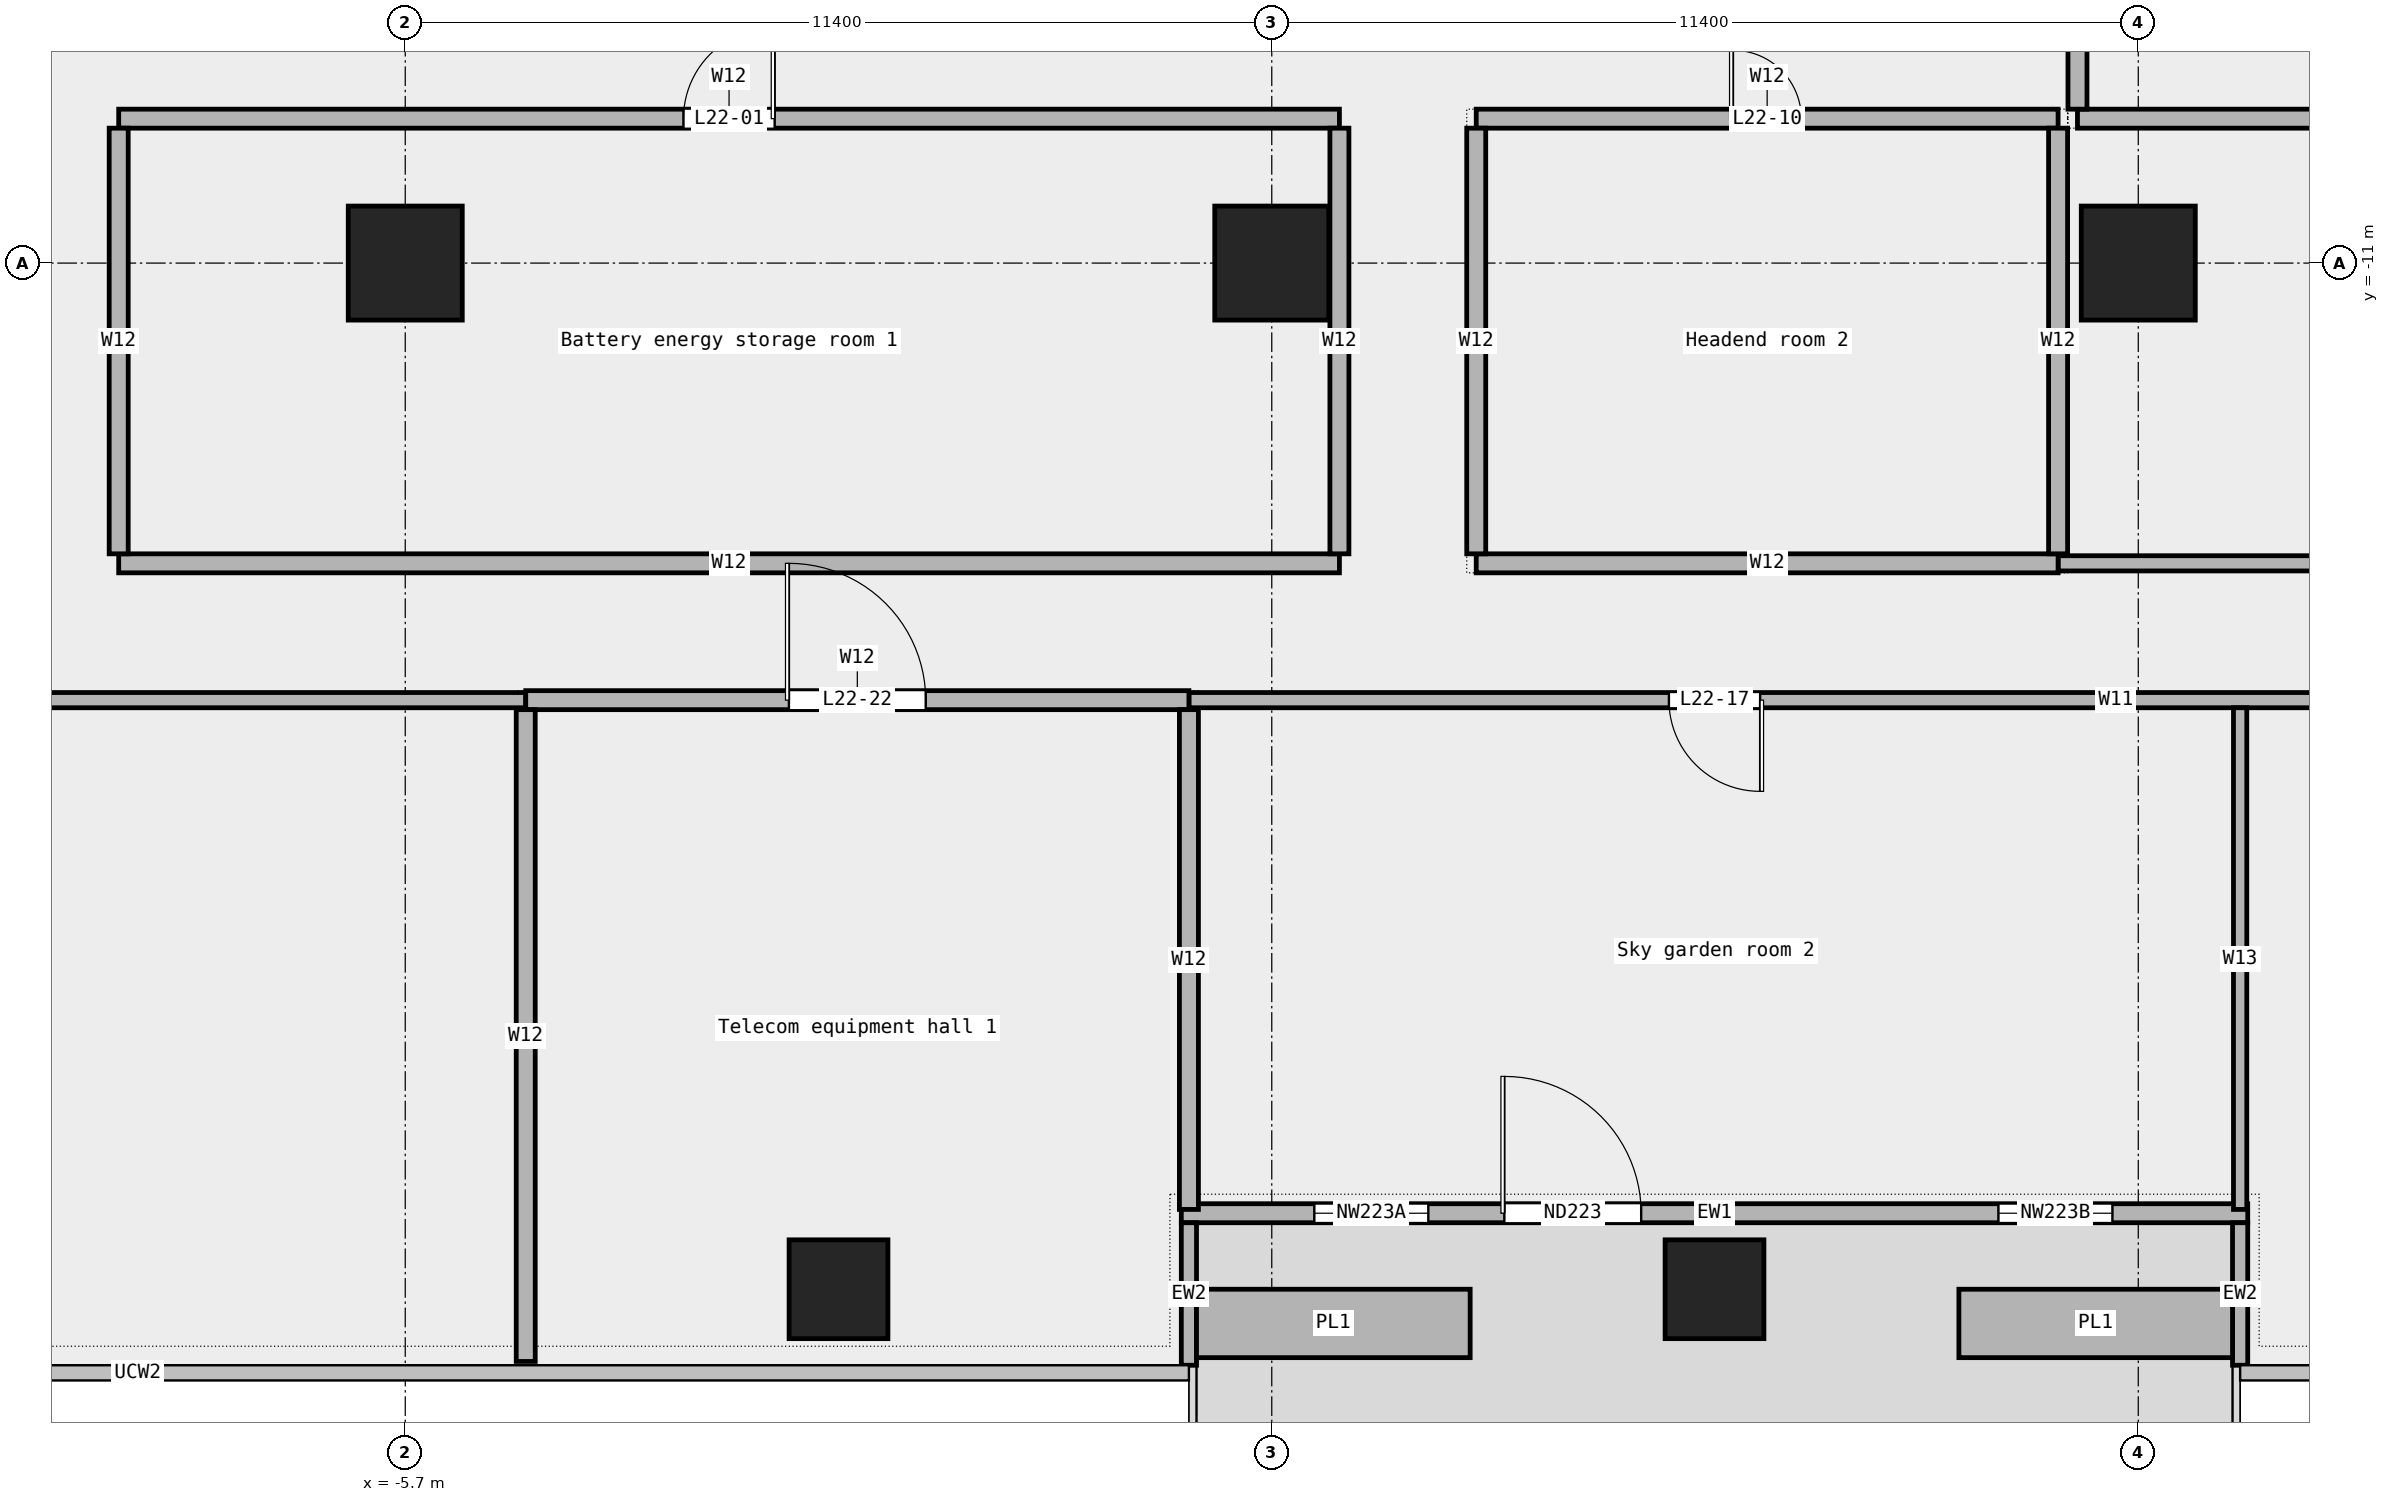
"""IFC4 building model, lengths in metres.
Left out: names, types, materials, properties, quantities, classifications, styles, units other than length and angle.
Written with IfcOpenShell. Run it as: python <this file> out.ifc"""

import sys

from ifc_helpers import new_model, si_unit, direction, frame, frame_2d, origin, origin_2d, place, context, subcontext, project, spatial, rectangle, extrude, element, fill, save


model = new_model("IFC4")
c1 = context("Model", 3, precision=1e-05, world=origin(), true_north=direction((0.0, 1.0)))
c2 = subcontext(c1, "Body", "Model", "MODEL_VIEW")
j1 = project(units=[si_unit("LENGTHUNIT", "METRE"), si_unit("PLANEANGLEUNIT", "RADIAN")], contexts=[c1])
p1 = place(None, origin())
s1 = spatial("IfcSite", under=j1, at=p1, CompositionType="ELEMENT")
p2 = place(p1, origin())
s2 = spatial("IfcBuilding", under=s1, at=p2, CompositionType="ELEMENT")
p3 = place(p2, frame((0.0, 0.0, 112.6)))
s3 = spatial("IfcBuildingStorey", under=s2, at=p3, CompositionType="ELEMENT", Elevation=112.6)
for number, where, z_axis, x_axis in (
    (1, (0.0, -24.5, 0.0), (0.0, 0.0, 1.0), (1.0, 0.0, 0.0)),
    (2, (11.525, -24.5, 0.0), (0.0, 0.0, 1.0), (1.0, 0.0, 0.0)),
):
    element("IfcColumn", number, at=place(p3, frame(where, z_axis=z_axis, x_axis=x_axis)), inside=s3, PredefinedType="COLUMN", context=c2, shape_type="SweptSolid", body=[
        extrude(rectangle(XDim=1.3, YDim=1.3, at=origin_2d()), origin(), (0.0, 0.0, 1.0), 4.05),
    ])
for number, where, z_axis, x_axis in (
    (3, (-5.7, -11.0, 0.0), (0.0, 0.0, 1.0), (1.0, 0.0, 0.0)),
    (4, (5.7, -11.0, 0.0), (0.0, 0.0, 1.0), (1.0, 0.0, 0.0)),
    (5, (17.1, -11.0, 0.0), (0.0, 0.0, 1.0), (1.0, 0.0, 0.0)),
):
    element("IfcColumn", number, at=place(p3, frame(where, z_axis=z_axis, x_axis=x_axis)), inside=s3, PredefinedType="COLUMN", context=c2, shape_type="SweptSolid", body=[
        extrude(rectangle(XDim=1.5, YDim=1.5, at=origin_2d()), origin(), (0.0, 0.0, 1.0), 4.05),
    ])
p4 = place(p3, frame((4.51, -23.5, 0.0), z_axis=(0.0, 0.0, 1.0), x_axis=(1.0, 0.0, 0.0)))
e6 = element("IfcWall", 6, at=p4, inside=s3, PredefinedType="STANDARD", context=c2, shape_type="SweptSolid", body=[
    extrude(rectangle(XDim=14.03, YDim=0.25, at=frame_2d((7.015, 0.0))), origin(), (0.0, 0.0, 1.0), 4.05),
])
p5 = place(p4, frame((1.75, 0.0, 0.45)))
e7 = element("IfcOpeningElement", 7, at=p5, cuts=e6, PredefinedType="OPENING", context=c2, shape_type="SweptSolid", body=[
    extrude(rectangle(XDim=1.5, YDim=3.0, at=frame_2d((0.75, 1.5))), frame((0.0, 0.137, 0.0), z_axis=(0.0, -1.0, 0.0), x_axis=(1.0, 0.0, 0.0)), (0.0, 0.0, 1.0), 0.274),
])
p6 = place(p4, frame((4.25, 0.0, 0.0)))
e8 = element("IfcOpeningElement", 8, at=p6, cuts=e6, PredefinedType="OPENING", context=c2, shape_type="SweptSolid", body=[
    extrude(rectangle(XDim=1.8, YDim=2.4, at=frame_2d((0.9, 1.2))), frame((0.0, 0.137, 0.0), z_axis=(0.0, -1.0, 0.0), x_axis=(1.0, 0.0, 0.0)), (0.0, 0.0, 1.0), 0.274),
])
p7 = place(p4, frame((10.75, 0.0, 0.45)))
e9 = element("IfcOpeningElement", 9, at=p7, cuts=e6, PredefinedType="OPENING", context=c2, shape_type="SweptSolid", body=[
    extrude(rectangle(XDim=1.5, YDim=3.0, at=frame_2d((0.75, 1.5))), frame((0.0, 0.137, 0.0), z_axis=(0.0, -1.0, 0.0), x_axis=(1.0, 0.0, 0.0)), (0.0, 0.0, 1.0), 0.274),
])
for number, where, z_axis, x_axis in (
    (10, (4.61, -25.5, 0.0), (0.0, 0.0, 1.0), (0.0, 1.0, 0.0)),
    (11, (18.44, -25.5, 0.0), (0.0, 0.0, 1.0), (0.0, 1.0, 0.0)),
):
    element("IfcWall", number, at=place(p3, frame(where, z_axis=z_axis, x_axis=x_axis)), inside=s3, PredefinedType="STANDARD", context=c2, shape_type="SweptSolid", body=[
        extrude(rectangle(XDim=1.875, YDim=0.2, at=frame_2d((0.938, 0.0))), origin(), (0.0, 0.0, 1.0), 4.05),
    ])
for number, where, z_axis, x_axis in (
    (12, (4.71, -24.95, 0.0), (0.0, 0.0, 1.0), (1.0, 0.0, 0.0)),
    (13, (14.74, -24.95, 0.0), (0.0, 0.0, 1.0), (1.0, 0.0, 0.0)),
):
    element("IfcWall", number, at=place(p3, frame(where, z_axis=z_axis, x_axis=x_axis)), inside=s3, PredefinedType="STANDARD", context=c2, shape_type="SweptSolid", body=[
        extrude(rectangle(XDim=3.6, YDim=0.9, at=frame_2d((1.8, 0.0))), origin(), (0.0, 0.0, 1.0), 0.7),
    ])
p8 = place(p3, frame((-29.0, -16.75, 0.0), z_axis=(0.0, 0.0, 1.0), x_axis=(1.0, 0.0, 0.0)))
e14 = element("IfcWall", 14, at=p8, inside=s3, PredefinedType="PARTITIONING", context=c2, shape_type="SweptSolid", body=[
    extrude(rectangle(XDim=24.885, YDim=0.2, at=frame_2d((12.442, 0.0))), origin(), (0.0, 0.0, 1.0), 4.05),
])
p9 = place(p8, frame((11.643, 0.0, 0.0)))
e15 = element("IfcOpeningElement", 15, at=p9, cuts=e14, PredefinedType="OPENING", context=c2, shape_type="SweptSolid", body=[
    extrude(rectangle(XDim=1.8, YDim=2.1, at=frame_2d((0.9, 1.05))), frame((0.0, 0.112, 0.0), z_axis=(0.0, -1.0, 0.0), x_axis=(1.0, 0.0, 0.0)), (0.0, 0.0, 1.0), 0.224),
])
p10 = place(p3, frame((4.61, -16.75, 0.0), z_axis=(0.0, 0.0, 1.0), x_axis=(1.0, 0.0, 0.0)))
e16 = element("IfcWall", 16, at=p10, inside=s3, PredefinedType="PARTITIONING", context=c2, shape_type="SweptSolid", body=[
    extrude(rectangle(XDim=24.39, YDim=0.2, at=frame_2d((12.195, 0.0))), origin(), (0.0, 0.0, 1.0), 4.05),
])
p11 = place(p10, frame((18.41, 0.0, 0.0)))
e17 = element("IfcOpeningElement", 17, at=p11, cuts=e16, PredefinedType="OPENING", context=c2, shape_type="SweptSolid", body=[
    extrude(rectangle(XDim=1.2, YDim=2.1, at=frame_2d((0.6, 1.05))), frame((0.0, 0.112, 0.0), z_axis=(0.0, -1.0, 0.0), x_axis=(1.0, 0.0, 0.0)), (0.0, 0.0, 1.0), 0.224),
])
p12 = place(p10, frame((6.315, 0.0, 0.0)))
e18 = element("IfcOpeningElement", 18, at=p12, cuts=e16, PredefinedType="OPENING", context=c2, shape_type="SweptSolid", body=[
    extrude(rectangle(XDim=1.2, YDim=2.1, at=frame_2d((0.6, 1.05))), frame((0.0, 0.112, 0.0), z_axis=(0.0, -1.0, 0.0), x_axis=(1.0, 0.0, 0.0)), (0.0, 0.0, 1.0), 0.224),
])
p13 = place(p3, frame((-4.115, -16.75, 0.0), z_axis=(0.0, 0.0, 1.0), x_axis=(1.0, 0.0, 0.0)))
e19 = element("IfcWall", 19, at=p13, inside=s3, PredefinedType="PARTITIONING", context=c2, shape_type="SweptSolid", body=[
    extrude(rectangle(XDim=8.725, YDim=0.25, at=frame_2d((4.363, 0.0))), origin(), (0.0, 0.0, 1.0), 4.05),
])
p14 = place(p13, frame((3.462, 0.0, 0.0)))
e20 = element("IfcOpeningElement", 20, at=p14, cuts=e19, PredefinedType="OPENING", context=c2, shape_type="SweptSolid", body=[
    extrude(rectangle(XDim=1.8, YDim=2.1, at=frame_2d((0.9, 1.05))), frame((0.0, 0.137, 0.0), z_axis=(0.0, -1.0, 0.0), x_axis=(1.0, 0.0, 0.0)), (0.0, 0.0, 1.0), 0.274),
])
p15 = place(p3, frame((16.045, -14.95, 0.0), z_axis=(0.0, 0.0, 1.0), x_axis=(1.0, 0.0, 0.0)))
e21 = element("IfcWall", 21, at=p15, inside=s3, PredefinedType="PARTITIONING", context=c2, shape_type="SweptSolid", body=[
    extrude(rectangle(XDim=12.955, YDim=0.2, at=frame_2d((6.478, 0.0))), origin(), (0.0, 0.0, 1.0), 4.05),
])
p16 = place(p15, frame((5.778, 0.0, 0.0)))
e22 = element("IfcOpeningElement", 22, at=p16, cuts=e21, PredefinedType="OPENING", context=c2, shape_type="SweptSolid", body=[
    extrude(rectangle(XDim=1.2, YDim=2.1, at=frame_2d((0.6, 1.05))), frame((0.0, 0.112, 0.0), z_axis=(0.0, -1.0, 0.0), x_axis=(1.0, 0.0, 0.0)), (0.0, 0.0, 1.0), 0.224),
])
p17 = place(p3, frame((-9.47, -14.95, 0.0), z_axis=(0.0, 0.0, 1.0), x_axis=(1.0, 0.0, 0.0)))
e23 = element("IfcWall", 23, at=p17, inside=s3, PredefinedType="PARTITIONING", context=c2, shape_type="SweptSolid", body=[
    extrude(rectangle(XDim=16.06, YDim=0.25, at=frame_2d((8.03, 0.0))), origin(), (0.0, 0.0, 1.0), 4.05),
])
p18 = place(p3, frame((8.39, -14.95, 0.0), z_axis=(0.0, 0.0, 1.0), x_axis=(1.0, 0.0, 0.0)))
e24 = element("IfcWall", 24, at=p18, inside=s3, PredefinedType="PARTITIONING", context=c2, shape_type="SweptSolid", body=[
    extrude(rectangle(XDim=7.655, YDim=0.25, at=frame_2d((3.828, 0.0))), origin(), (0.0, 0.0, 1.0), 4.05),
])
p19 = place(p3, frame((-9.47, -9.1, 0.0), z_axis=(0.0, 0.0, 1.0), x_axis=(1.0, 0.0, 0.0)))
e25 = element("IfcWall", 25, at=p19, inside=s3, PredefinedType="PARTITIONING", context=c2, shape_type="SweptSolid", body=[
    extrude(rectangle(XDim=16.06, YDim=0.25, at=frame_2d((8.03, 0.0))), origin(), (0.0, 0.0, 1.0), 4.05),
])
p20 = place(p19, frame((7.43, 0.0, 0.0)))
e26 = element("IfcOpeningElement", 26, at=p20, cuts=e25, PredefinedType="OPENING", context=c2, shape_type="SweptSolid", body=[
    extrude(rectangle(XDim=1.2, YDim=2.1, at=frame_2d((0.6, 1.05))), frame((0.0, 0.137, 0.0), z_axis=(0.0, -1.0, 0.0), x_axis=(1.0, 0.0, 0.0)), (0.0, 0.0, 1.0), 0.274),
])
p21 = place(p3, frame((8.39, -9.1, 0.0), z_axis=(0.0, 0.0, 1.0), x_axis=(1.0, 0.0, 0.0)))
e27 = element("IfcWall", 27, at=p21, inside=s3, PredefinedType="PARTITIONING", context=c2, shape_type="SweptSolid", body=[
    extrude(rectangle(XDim=7.655, YDim=0.25, at=frame_2d((3.828, 0.0))), origin(), (0.0, 0.0, 1.0), 4.05),
])
p22 = place(p21, frame((3.377, 0.0, 0.0)))
e28 = element("IfcOpeningElement", 28, at=p22, cuts=e27, PredefinedType="OPENING", context=c2, shape_type="SweptSolid", body=[
    extrude(rectangle(XDim=0.9, YDim=2.1, at=frame_2d((0.45, 1.05))), frame((0.0, 0.137, 0.0), z_axis=(0.0, -1.0, 0.0), x_axis=(1.0, 0.0, 0.0)), (0.0, 0.0, 1.0), 0.274),
])
p23 = place(p3, frame((16.3, -9.1, 0.0), z_axis=(0.0, 0.0, 1.0), x_axis=(1.0, 0.0, 0.0)))
e29 = element("IfcWall", 29, at=p23, inside=s3, PredefinedType="PARTITIONING", context=c2, shape_type="SweptSolid", body=[
    extrude(rectangle(XDim=12.7, YDim=0.25, at=frame_2d((6.35, 0.0))), origin(), (0.0, 0.0, 1.0), 4.05),
])
p24 = place(p3, frame((-9.47, -14.825, 0.0), z_axis=(0.0, 0.0, 1.0), x_axis=(0.0, 1.0, 0.0)))
e30 = element("IfcWall", 30, at=p24, inside=s3, PredefinedType="PARTITIONING", context=c2, shape_type="SweptSolid", body=[
    extrude(rectangle(XDim=5.6, YDim=0.25, at=frame_2d((2.8, 0.0))), origin(), (0.0, 0.0, 1.0), 4.05),
])
p25 = place(p3, frame((-4.115, -25.45, 0.0), z_axis=(0.0, 0.0, 1.0), x_axis=(0.0, 1.0, 0.0)))
e31 = element("IfcWall", 31, at=p25, inside=s3, PredefinedType="PARTITIONING", context=c2, shape_type="SweptSolid", body=[
    extrude(rectangle(XDim=8.575, YDim=0.25, at=frame_2d((4.288, 0.0))), origin(), (0.0, 0.0, 1.0), 4.05),
])
p26 = place(p3, frame((4.61, -23.45, 0.0), z_axis=(0.0, 0.0, 1.0), x_axis=(0.0, 1.0, 0.0)))
e32 = element("IfcWall", 32, at=p26, inside=s3, PredefinedType="PARTITIONING", context=c2, shape_type="SweptSolid", body=[
    extrude(rectangle(XDim=6.575, YDim=0.25, at=frame_2d((3.288, 0.0))), origin(), (0.0, 0.0, 1.0), 4.05),
])
for number, where, z_axis, x_axis in (
    (33, (6.59, -14.825, 0.0), (0.0, 0.0, 1.0), (0.0, 1.0, 0.0)),
    (34, (8.39, -14.825, 0.0), (0.0, 0.0, 1.0), (0.0, 1.0, 0.0)),
    (35, (16.045, -14.825, 0.0), (0.0, 0.0, 1.0), (0.0, 1.0, 0.0)),
):
    element("IfcWall", number, at=place(p3, frame(where, z_axis=z_axis, x_axis=x_axis)), inside=s3, PredefinedType="PARTITIONING", context=c2, shape_type="SweptSolid", body=[
        extrude(rectangle(XDim=5.6, YDim=0.25, at=frame_2d((2.8, 0.0))), origin(), (0.0, 0.0, 1.0), 4.05),
    ])
p27 = place(p3, frame((16.3, -8.975, 0.0), z_axis=(0.0, 0.0, 1.0), x_axis=(0.0, 1.0, 0.0)))
e36 = element("IfcWall", 36, at=p27, inside=s3, PredefinedType="PARTITIONING", context=c2, shape_type="SweptSolid", body=[
    extrude(rectangle(XDim=8.225, YDim=0.25, at=frame_2d((4.113, 0.0))), origin(), (0.0, 0.0, 1.0), 4.05),
])
p28 = place(p27, frame((3.212, 0.0, 0.0)))
e37 = element("IfcOpeningElement", 37, at=p28, cuts=e36, PredefinedType="OPENING", context=c2, shape_type="SweptSolid", body=[
    extrude(rectangle(XDim=1.8, YDim=2.1, at=frame_2d((0.9, 1.05))), frame((0.0, 0.137, 0.0), z_axis=(0.0, -1.0, 0.0), x_axis=(1.0, 0.0, 0.0)), (0.0, 0.0, 1.0), 0.274),
])
p29 = place(p3, frame((18.44, -23.45, 0.0), z_axis=(0.0, 0.0, 1.0), x_axis=(0.0, 1.0, 0.0)))
e38 = element("IfcWall", 38, at=p29, inside=s3, PredefinedType="PARTITIONING", context=c2, shape_type="SweptSolid", body=[
    extrude(rectangle(XDim=6.6, YDim=0.175, at=frame_2d((3.3, 0.0))), origin(), (0.0, 0.0, 1.0), 4.05),
])
p30 = place(p5, origin())
e39 = element("IfcWindow", 39, at=p30, inside=s3, PartitioningType="SINGLE_PANEL", PredefinedType="WINDOW", context=c2, shape_type="SweptSolid", body=[
    extrude(rectangle(XDim=1.5, YDim=3.0, at=frame_2d((0.75, 1.5))), frame((0.0, 0.03, 0.0), z_axis=(0.0, -1.0, 0.0), x_axis=(1.0, 0.0, 0.0)), (0.0, 0.0, 1.0), 0.06),
])
fill(e7, e39)
p31 = place(p6, origin())
e40 = element("IfcDoor", 40, at=p31, inside=s3, OperationType="DOUBLE_DOOR_SINGLE_SWING", PredefinedType="DOOR", context=c2, shape_type="SweptSolid", body=[
    extrude(rectangle(XDim=1.8, YDim=2.4, at=frame_2d((0.9, 1.2))), frame((0.0, 0.025, 0.0), z_axis=(0.0, -1.0, 0.0), x_axis=(1.0, 0.0, 0.0)), (0.0, 0.0, 1.0), 0.05),
])
fill(e8, e40)
p32 = place(p7, origin())
e41 = element("IfcWindow", 41, at=p32, inside=s3, PartitioningType="SINGLE_PANEL", PredefinedType="WINDOW", context=c2, shape_type="SweptSolid", body=[
    extrude(rectangle(XDim=1.5, YDim=3.0, at=frame_2d((0.75, 1.5))), frame((0.0, 0.03, 0.0), z_axis=(0.0, -1.0, 0.0), x_axis=(1.0, 0.0, 0.0)), (0.0, 0.0, 1.0), 0.06),
])
fill(e9, e41)
p33 = place(p20, origin())
e42 = element("IfcDoor", 42, at=p33, inside=s3, OperationType="SINGLE_SWING_RIGHT", PredefinedType="DOOR", context=c2, shape_type="SweptSolid", body=[
    extrude(rectangle(XDim=1.2, YDim=2.1, at=frame_2d((0.6, 1.05))), frame((0.0, 0.025, 0.0), z_axis=(0.0, -1.0, 0.0), x_axis=(1.0, 0.0, 0.0)), (0.0, 0.0, 1.0), 0.05),
])
fill(e26, e42)
p34 = place(p22, origin())
e43 = element("IfcDoor", 43, at=p34, inside=s3, OperationType="SINGLE_SWING_LEFT", PredefinedType="DOOR", context=c2, shape_type="SweptSolid", body=[
    extrude(rectangle(XDim=0.9, YDim=2.1, at=frame_2d((0.45, 1.05))), frame((0.0, 0.025, 0.0), z_axis=(0.0, -1.0, 0.0), x_axis=(1.0, 0.0, 0.0)), (0.0, 0.0, 1.0), 0.05),
])
fill(e28, e43)
p35 = place(p12, origin())
e44 = element("IfcDoor", 44, at=p35, inside=s3, OperationType="SINGLE_SWING_LEFT", PredefinedType="DOOR", context=c2, shape_type="SweptSolid", body=[
    extrude(rectangle(XDim=1.2, YDim=2.1, at=frame_2d((0.6, 1.05))), frame((0.0, 0.025, 0.0), z_axis=(0.0, -1.0, 0.0), x_axis=(1.0, 0.0, 0.0)), (0.0, 0.0, 1.0), 0.05),
])
fill(e18, e44)
p36 = place(p14, origin())
e45 = element("IfcDoor", 45, at=p36, inside=s3, OperationType="DOUBLE_DOOR_SINGLE_SWING", PredefinedType="DOOR", context=c2, shape_type="SweptSolid", body=[
    extrude(rectangle(XDim=1.8, YDim=2.1, at=frame_2d((0.9, 1.05))), frame((0.0, 0.025, 0.0), z_axis=(0.0, -1.0, 0.0), x_axis=(1.0, 0.0, 0.0)), (0.0, 0.0, 1.0), 0.05),
])
fill(e20, e45)
save(model, sys.argv[1])
